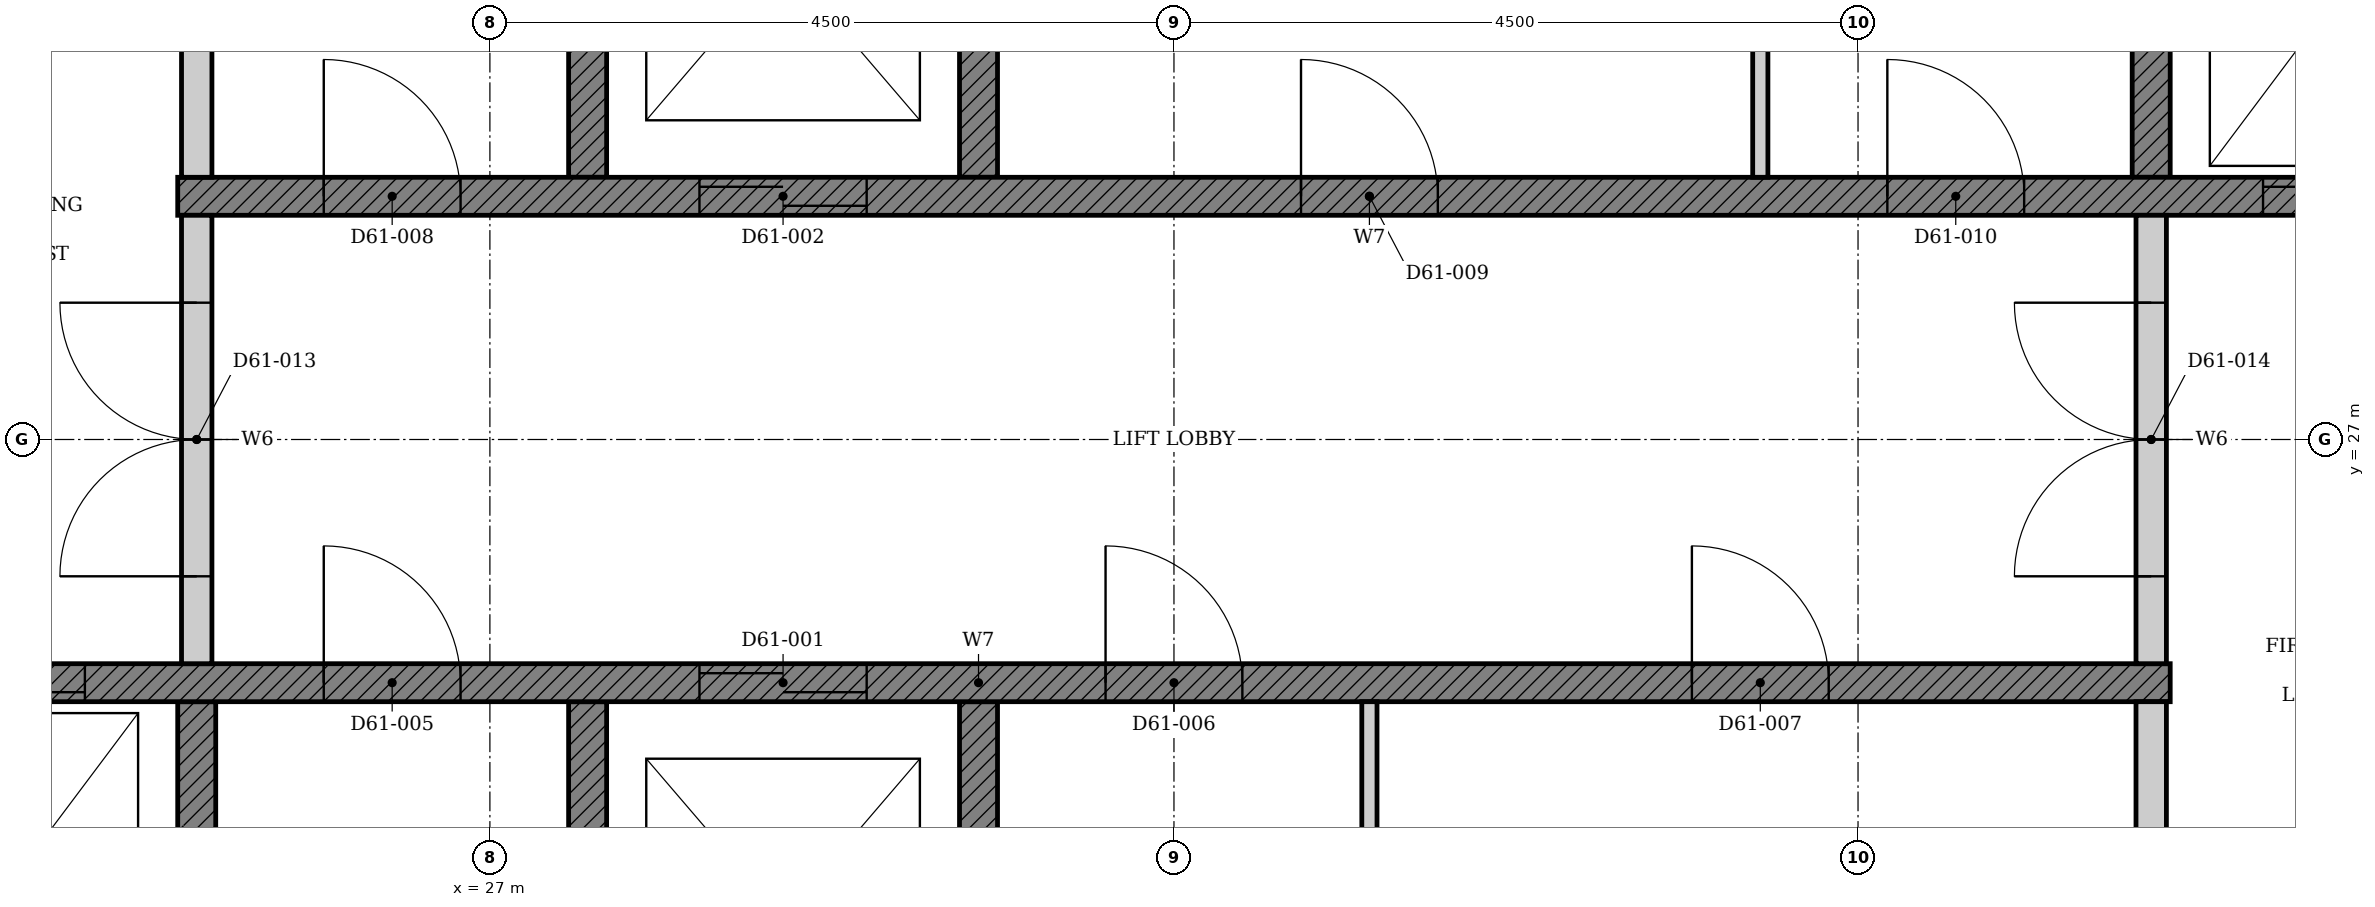
"""IFC4 building model, lengths in metres.
Left out: names, types, materials, properties, quantities, classifications, styles, units other than length and angle.
Written with IfcOpenShell. Run it as: python <this file> out.ifc"""

import sys

from ifc_helpers import new_model, si_unit, direction, frame, frame_2d, origin, place, context, subcontext, project, spatial, polyline, rectangle, outline, extrude, element, fill, save


model = new_model("IFC4")
c1 = context("Model", 3, precision=1e-05, world=origin(), true_north=direction((0.0, 1.0)))
c2 = subcontext(c1, "Body", "Model", "MODEL_VIEW")
j1 = project(units=[si_unit("LENGTHUNIT", "METRE"), si_unit("PLANEANGLEUNIT", "RADIAN")], contexts=[c1])
p1 = place(None, origin())
s1 = spatial("IfcSite", under=j1, at=p1, CompositionType="ELEMENT")
p2 = place(p1, origin())
s2 = spatial("IfcBuilding", under=s1, at=p2, CompositionType="ELEMENT")
p3 = place(p2, frame((0.0, 0.0, 241.6)))
s3 = spatial("IfcBuildingStorey", under=s2, at=p3, CompositionType="ELEMENT", Elevation=241.6)
p4 = place(p3, origin())
e1 = element("IfcWall", 1, at=p4, inside=s3, PredefinedType="SHEAR", context=c2, shape_type="SweptSolid", body=[
    extrude(outline(polyline([(22.375, 22.35), (25.197, 22.35), (25.197, 25.275), (24.947, 25.275), (24.947, 22.65), (22.625, 22.65), (22.625, 25.275), (22.375, 25.275), (22.375, 22.35)])), origin(), (0.0, 0.0, 1.0), 3.4),
])
p5 = place(p3, origin())
e2 = element("IfcWall", 2, at=p5, inside=s3, PredefinedType="SHEAR", context=c2, shape_type="SweptSolid", body=[
    extrude(outline(polyline([(27.518, 22.35), (30.339, 22.35), (30.339, 25.275), (30.089, 25.275), (30.089, 22.65), (27.768, 22.65), (27.768, 25.275), (27.518, 25.275), (27.518, 22.35)])), origin(), (0.0, 0.0, 1.0), 3.4),
])
p6 = place(p3, origin())
e3 = element("IfcWall", 3, at=p6, inside=s3, PredefinedType="SHEAR", context=c2, shape_type="SweptSolid", body=[
    extrude(outline(polyline([(27.518, 28.725), (27.768, 28.725), (27.768, 31.35), (30.089, 31.35), (30.089, 28.725), (30.339, 28.725), (30.339, 31.65), (27.518, 31.65), (27.518, 28.725)])), origin(), (0.0, 0.0, 1.0), 3.4),
])
p7 = place(p3, origin())
e4 = element("IfcWall", 4, at=p7, inside=s3, PredefinedType="SHEAR", context=c2, shape_type="SweptSolid", body=[
    extrude(outline(polyline([(37.803, 28.725), (38.053, 28.725), (38.053, 31.35), (40.375, 31.35), (40.375, 28.725), (40.625, 28.725), (40.625, 31.65), (37.803, 31.65), (37.803, 28.725)])), origin(), (0.0, 0.0, 1.0), 3.4),
])
p8 = place(p3, frame((22.375, 25.4, 0.0), z_axis=(0.0, 0.0, 1.0), x_axis=(1.0, 0.0, 0.0)))
e5 = element("IfcWall", 5, at=p8, inside=s3, PredefinedType="SHEAR", context=c2, shape_type="SweptSolid", body=[
    extrude(rectangle(XDim=15.678, YDim=0.25, at=frame_2d((7.839, 0.0))), origin(), (0.0, 0.0, 1.0), 3.4),
])
p9 = place(p8, frame((6.004, 0.0, 0.0)))
e6 = element("IfcOpeningElement", 6, at=p9, cuts=e5, PredefinedType="OPENING", context=c2, shape_type="SweptSolid", body=[
    extrude(rectangle(XDim=1.1, YDim=2.1, at=frame_2d((0.55, 1.05))), frame((0.0, 0.135, 0.0), z_axis=(0.0, -1.0, 0.0), x_axis=(1.0, 0.0, 0.0)), (0.0, 0.0, 1.0), 0.27),
])
p10 = place(p8, frame((0.861, 0.0, 0.0)))
e7 = element("IfcOpeningElement", 7, at=p10, cuts=e5, PredefinedType="OPENING", context=c2, shape_type="SweptSolid", body=[
    extrude(rectangle(XDim=1.1, YDim=2.1, at=frame_2d((0.55, 1.05))), frame((0.0, 0.135, 0.0), z_axis=(0.0, -1.0, 0.0), x_axis=(1.0, 0.0, 0.0)), (0.0, 0.0, 1.0), 0.27),
])
p11 = place(p8, frame((3.532, 0.0, 0.0)))
e8 = element("IfcOpeningElement", 8, at=p11, cuts=e5, PredefinedType="OPENING", context=c2, shape_type="SweptSolid", body=[
    extrude(rectangle(XDim=0.9, YDim=2.1, at=frame_2d((0.45, 1.05))), frame((0.0, 0.135, 0.0), z_axis=(0.0, -1.0, 0.0), x_axis=(1.0, 0.0, 0.0)), (0.0, 0.0, 1.0), 0.27),
])
p12 = place(p8, frame((8.675, 0.0, 0.0)))
e9 = element("IfcOpeningElement", 9, at=p12, cuts=e5, PredefinedType="OPENING", context=c2, shape_type="SweptSolid", body=[
    extrude(rectangle(XDim=0.9, YDim=2.1, at=frame_2d((0.45, 1.05))), frame((0.0, 0.135, 0.0), z_axis=(0.0, -1.0, 0.0), x_axis=(1.0, 0.0, 0.0)), (0.0, 0.0, 1.0), 0.27),
])
p13 = place(p8, frame((12.532, 0.0, 0.0)))
e10 = element("IfcOpeningElement", 10, at=p13, cuts=e5, PredefinedType="OPENING", context=c2, shape_type="SweptSolid", body=[
    extrude(rectangle(XDim=0.9, YDim=2.1, at=frame_2d((0.45, 1.05))), frame((0.0, 0.135, 0.0), z_axis=(0.0, -1.0, 0.0), x_axis=(1.0, 0.0, 0.0)), (0.0, 0.0, 1.0), 0.27),
])
p14 = place(p3, frame((24.947, 28.6, 0.0), z_axis=(0.0, 0.0, 1.0), x_axis=(1.0, 0.0, 0.0)))
e11 = element("IfcWall", 11, at=p14, inside=s3, PredefinedType="SHEAR", context=c2, shape_type="SweptSolid", body=[
    extrude(rectangle(XDim=15.678, YDim=0.25, at=frame_2d((7.839, 0.0))), origin(), (0.0, 0.0, 1.0), 3.4),
])
p15 = place(p14, frame((3.432, 0.0, 0.0)))
e12 = element("IfcOpeningElement", 12, at=p15, cuts=e11, PredefinedType="OPENING", context=c2, shape_type="SweptSolid", body=[
    extrude(rectangle(XDim=1.1, YDim=2.1, at=frame_2d((0.55, 1.05))), frame((0.0, 0.135, 0.0), z_axis=(0.0, -1.0, 0.0), x_axis=(1.0, 0.0, 0.0)), (0.0, 0.0, 1.0), 0.27),
])
p16 = place(p14, frame((13.718, 0.0, 0.0)))
e13 = element("IfcOpeningElement", 13, at=p16, cuts=e11, PredefinedType="OPENING", context=c2, shape_type="SweptSolid", body=[
    extrude(rectangle(XDim=1.1, YDim=2.1, at=frame_2d((0.55, 1.05))), frame((0.0, 0.135, 0.0), z_axis=(0.0, -1.0, 0.0), x_axis=(1.0, 0.0, 0.0)), (0.0, 0.0, 1.0), 0.27),
])
p17 = place(p14, frame((0.961, 0.0, 0.0)))
e14 = element("IfcOpeningElement", 14, at=p17, cuts=e11, PredefinedType="OPENING", context=c2, shape_type="SweptSolid", body=[
    extrude(rectangle(XDim=0.9, YDim=2.1, at=frame_2d((0.45, 1.05))), frame((0.0, 0.135, 0.0), z_axis=(0.0, -1.0, 0.0), x_axis=(1.0, 0.0, 0.0)), (0.0, 0.0, 1.0), 0.27),
])
p18 = place(p14, frame((7.389, 0.0, 0.0)))
e15 = element("IfcOpeningElement", 15, at=p18, cuts=e11, PredefinedType="OPENING", context=c2, shape_type="SweptSolid", body=[
    extrude(rectangle(XDim=0.9, YDim=2.1, at=frame_2d((0.45, 1.05))), frame((0.0, 0.135, 0.0), z_axis=(0.0, -1.0, 0.0), x_axis=(1.0, 0.0, 0.0)), (0.0, 0.0, 1.0), 0.27),
])
p19 = place(p14, frame((11.246, 0.0, 0.0)))
e16 = element("IfcOpeningElement", 16, at=p19, cuts=e11, PredefinedType="OPENING", context=c2, shape_type="SweptSolid", body=[
    extrude(rectangle(XDim=0.9, YDim=2.1, at=frame_2d((0.45, 1.05))), frame((0.0, 0.135, 0.0), z_axis=(0.0, -1.0, 0.0), x_axis=(1.0, 0.0, 0.0)), (0.0, 0.0, 1.0), 0.27),
])
p20 = place(p3, frame((37.928, 22.65, 0.0), z_axis=(0.0, 0.0, 1.0), x_axis=(0.0, 1.0, 0.0)))
e17 = element("IfcWall", 17, at=p20, inside=s3, PredefinedType="PARTITIONING", context=c2, shape_type="SweptSolid", body=[
    extrude(rectangle(XDim=2.625, YDim=0.2, at=frame_2d((1.312, 0.0))), origin(), (0.0, 0.0, 1.0), 3.4),
])
p21 = place(p3, frame((32.786, 22.65, 0.0), z_axis=(0.0, 0.0, 1.0), x_axis=(0.0, 1.0, 0.0)))
e18 = element("IfcWall", 18, at=p21, inside=s3, PredefinedType="PARTITIONING", context=c2, shape_type="SweptSolid", body=[
    extrude(rectangle(XDim=2.625, YDim=0.1, at=frame_2d((1.312, 0.0))), origin(), (0.0, 0.0, 1.0), 3.4),
])
p22 = place(p3, frame((25.072, 28.725, 0.0), z_axis=(0.0, 0.0, 1.0), x_axis=(0.0, 1.0, 0.0)))
e19 = element("IfcWall", 19, at=p22, inside=s3, PredefinedType="PARTITIONING", context=c2, shape_type="SweptSolid", body=[
    extrude(rectangle(XDim=2.625, YDim=0.2, at=frame_2d((1.312, 0.0))), origin(), (0.0, 0.0, 1.0), 3.4),
])
p23 = place(p3, frame((35.357, 28.725, 0.0), z_axis=(0.0, 0.0, 1.0), x_axis=(0.0, 1.0, 0.0)))
e20 = element("IfcWall", 20, at=p23, inside=s3, PredefinedType="PARTITIONING", context=c2, shape_type="SweptSolid", body=[
    extrude(rectangle(XDim=2.625, YDim=0.1, at=frame_2d((1.312, 0.0))), origin(), (0.0, 0.0, 1.0), 3.4),
])
p24 = place(p3, frame((25.072, 25.525, 0.0), z_axis=(0.0, 0.0, 1.0), x_axis=(0.0, 1.0, 0.0)))
e21 = element("IfcWall", 21, at=p24, inside=s3, PredefinedType="PARTITIONING", context=c2, shape_type="SweptSolid", body=[
    extrude(rectangle(XDim=2.95, YDim=0.2, at=frame_2d((1.475, 0.0))), origin(), (0.0, 0.0, 1.0), 3.4),
])
p25 = place(p24, frame((0.575, 0.0, 0.0)))
e22 = element("IfcOpeningElement", 22, at=p25, cuts=e21, PredefinedType="OPENING", context=c2, shape_type="SweptSolid", body=[
    extrude(rectangle(XDim=1.8, YDim=2.1, at=frame_2d((0.9, 1.05))), frame((0.0, 0.11, 0.0), z_axis=(0.0, -1.0, 0.0), x_axis=(1.0, 0.0, 0.0)), (0.0, 0.0, 1.0), 0.22),
])
p26 = place(p3, frame((37.928, 25.525, 0.0), z_axis=(0.0, 0.0, 1.0), x_axis=(0.0, 1.0, 0.0)))
e23 = element("IfcWall", 23, at=p26, inside=s3, PredefinedType="PARTITIONING", context=c2, shape_type="SweptSolid", body=[
    extrude(rectangle(XDim=2.95, YDim=0.2, at=frame_2d((1.475, 0.0))), origin(), (0.0, 0.0, 1.0), 3.4),
])
p27 = place(p26, frame((0.575, 0.0, 0.0)))
e24 = element("IfcOpeningElement", 24, at=p27, cuts=e23, PredefinedType="OPENING", context=c2, shape_type="SweptSolid", body=[
    extrude(rectangle(XDim=1.8, YDim=2.1, at=frame_2d((0.9, 1.05))), frame((0.0, 0.11, 0.0), z_axis=(0.0, -1.0, 0.0), x_axis=(1.0, 0.0, 0.0)), (0.0, 0.0, 1.0), 0.22),
])
p28 = place(p9, origin())
e25 = element("IfcDoor", 25, at=p28, inside=s3, OperationType="DOUBLE_DOOR_SLIDING", PredefinedType="DOOR", context=c2, shape_type="SweptSolid", body=[
    extrude(rectangle(XDim=1.1, YDim=2.1, at=frame_2d((0.55, 1.05))), frame((0.0, 0.025, 0.0), z_axis=(0.0, -1.0, 0.0), x_axis=(1.0, 0.0, 0.0)), (0.0, 0.0, 1.0), 0.05),
])
fill(e6, e25)
p29 = place(p15, origin())
e26 = element("IfcDoor", 26, at=p29, inside=s3, OperationType="DOUBLE_DOOR_SLIDING", PredefinedType="DOOR", context=c2, shape_type="SweptSolid", body=[
    extrude(rectangle(XDim=1.1, YDim=2.1, at=frame_2d((0.55, 1.05))), frame((0.0, 0.025, 0.0), z_axis=(0.0, -1.0, 0.0), x_axis=(1.0, 0.0, 0.0)), (0.0, 0.0, 1.0), 0.05),
])
fill(e12, e26)
p30 = place(p10, origin())
e27 = element("IfcDoor", 27, at=p30, inside=s3, OperationType="DOUBLE_DOOR_SLIDING", PredefinedType="DOOR", context=c2, shape_type="SweptSolid", body=[
    extrude(rectangle(XDim=1.1, YDim=2.1, at=frame_2d((0.55, 1.05))), frame((0.0, 0.025, 0.0), z_axis=(0.0, -1.0, 0.0), x_axis=(1.0, 0.0, 0.0)), (0.0, 0.0, 1.0), 0.05),
])
fill(e7, e27)
p31 = place(p16, origin())
e28 = element("IfcDoor", 28, at=p31, inside=s3, OperationType="DOUBLE_DOOR_SLIDING", PredefinedType="DOOR", context=c2, shape_type="SweptSolid", body=[
    extrude(rectangle(XDim=1.1, YDim=2.1, at=frame_2d((0.55, 1.05))), frame((0.0, 0.025, 0.0), z_axis=(0.0, -1.0, 0.0), x_axis=(1.0, 0.0, 0.0)), (0.0, 0.0, 1.0), 0.05),
])
fill(e13, e28)
p32 = place(p11, origin())
e29 = element("IfcDoor", 29, at=p32, inside=s3, OperationType="SINGLE_SWING_LEFT", PredefinedType="DOOR", context=c2, shape_type="SweptSolid", body=[
    extrude(rectangle(XDim=0.9, YDim=2.1, at=frame_2d((0.45, 1.05))), frame((0.0, 0.025, 0.0), z_axis=(0.0, -1.0, 0.0), x_axis=(1.0, 0.0, 0.0)), (0.0, 0.0, 1.0), 0.05),
])
fill(e8, e29)
p33 = place(p12, origin())
e30 = element("IfcDoor", 30, at=p33, inside=s3, OperationType="SINGLE_SWING_LEFT", PredefinedType="DOOR", context=c2, shape_type="SweptSolid", body=[
    extrude(rectangle(XDim=0.9, YDim=2.1, at=frame_2d((0.45, 1.05))), frame((0.0, 0.025, 0.0), z_axis=(0.0, -1.0, 0.0), x_axis=(1.0, 0.0, 0.0)), (0.0, 0.0, 1.0), 0.05),
])
fill(e9, e30)
p34 = place(p13, origin())
e31 = element("IfcDoor", 31, at=p34, inside=s3, OperationType="SINGLE_SWING_LEFT", PredefinedType="DOOR", context=c2, shape_type="SweptSolid", body=[
    extrude(rectangle(XDim=0.9, YDim=2.1, at=frame_2d((0.45, 1.05))), frame((0.0, 0.025, 0.0), z_axis=(0.0, -1.0, 0.0), x_axis=(1.0, 0.0, 0.0)), (0.0, 0.0, 1.0), 0.05),
])
fill(e10, e31)
p35 = place(p17, origin())
e32 = element("IfcDoor", 32, at=p35, inside=s3, OperationType="SINGLE_SWING_LEFT", PredefinedType="DOOR", context=c2, shape_type="SweptSolid", body=[
    extrude(rectangle(XDim=0.9, YDim=2.1, at=frame_2d((0.45, 1.05))), frame((0.0, 0.025, 0.0), z_axis=(0.0, -1.0, 0.0), x_axis=(1.0, 0.0, 0.0)), (0.0, 0.0, 1.0), 0.05),
])
fill(e14, e32)
p36 = place(p18, origin())
e33 = element("IfcDoor", 33, at=p36, inside=s3, OperationType="SINGLE_SWING_LEFT", PredefinedType="DOOR", context=c2, shape_type="SweptSolid", body=[
    extrude(rectangle(XDim=0.9, YDim=2.1, at=frame_2d((0.45, 1.05))), frame((0.0, 0.025, 0.0), z_axis=(0.0, -1.0, 0.0), x_axis=(1.0, 0.0, 0.0)), (0.0, 0.0, 1.0), 0.05),
])
fill(e15, e33)
p37 = place(p19, origin())
e34 = element("IfcDoor", 34, at=p37, inside=s3, OperationType="SINGLE_SWING_LEFT", PredefinedType="DOOR", context=c2, shape_type="SweptSolid", body=[
    extrude(rectangle(XDim=0.9, YDim=2.1, at=frame_2d((0.45, 1.05))), frame((0.0, 0.025, 0.0), z_axis=(0.0, -1.0, 0.0), x_axis=(1.0, 0.0, 0.0)), (0.0, 0.0, 1.0), 0.05),
])
fill(e16, e34)
p38 = place(p25, origin())
e35 = element("IfcDoor", 35, at=p38, inside=s3, OperationType="DOUBLE_DOOR_SINGLE_SWING", PredefinedType="DOOR", context=c2, shape_type="SweptSolid", body=[
    extrude(rectangle(XDim=1.8, YDim=2.1, at=frame_2d((0.9, 1.05))), frame((0.0, 0.025, 0.0), z_axis=(0.0, -1.0, 0.0), x_axis=(1.0, 0.0, 0.0)), (0.0, 0.0, 1.0), 0.05),
])
fill(e22, e35)
p39 = place(p27, origin())
e36 = element("IfcDoor", 36, at=p39, inside=s3, OperationType="DOUBLE_DOOR_SINGLE_SWING", PredefinedType="DOOR", context=c2, shape_type="SweptSolid", body=[
    extrude(rectangle(XDim=1.8, YDim=2.1, at=frame_2d((0.9, 1.05))), frame((0.0, 0.025, 0.0), z_axis=(0.0, -1.0, 0.0), x_axis=(1.0, 0.0, 0.0)), (0.0, 0.0, 1.0), 0.05),
])
fill(e24, e36)
save(model, sys.argv[1])
